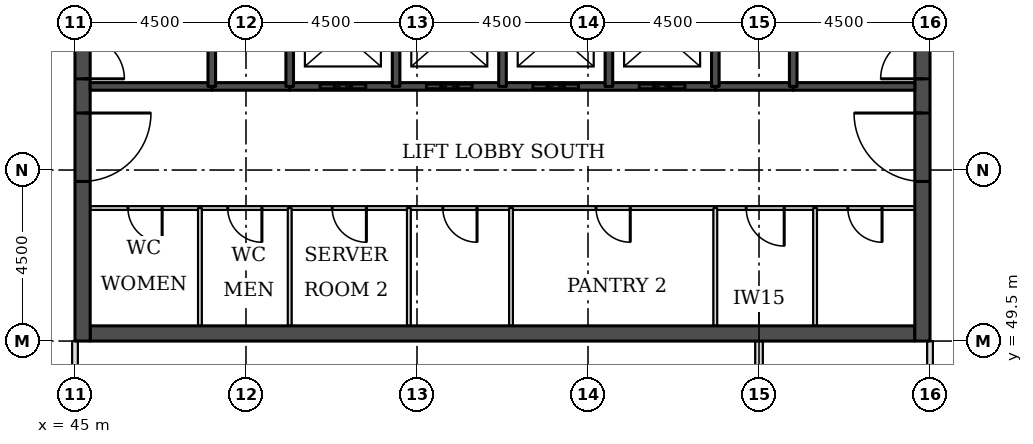
"""IFC4 building model, lengths in metres.
Left out: names, types, materials, properties, quantities, classifications, styles, units other than length and angle.
Written with IfcOpenShell. Run it as: python <this file> out.ifc"""

import sys

from ifc_helpers import new_model, si_unit, direction, frame, frame_2d, origin, place, context, subcontext, project, spatial, rectangle, extrude, element, fill, save


model = new_model("IFC4")
c1 = context("Model", 3, precision=1e-05, world=origin(), true_north=direction((0.0, 1.0)))
c2 = subcontext(c1, "Body", "Model", "MODEL_VIEW")
j1 = project(units=[si_unit("LENGTHUNIT", "METRE"), si_unit("PLANEANGLEUNIT", "RADIAN")], contexts=[c1])
p1 = place(None, origin())
s1 = spatial("IfcSite", under=j1, at=p1, CompositionType="ELEMENT")
p2 = place(p1, origin())
s2 = spatial("IfcBuilding", under=s1, at=p2, CompositionType="ELEMENT")
p3 = place(p2, frame((0.0, 0.0, 184.7)))
s3 = spatial("IfcBuildingStorey", under=s2, at=p3, CompositionType="ELEMENT", Elevation=184.7)
p4 = place(p3, frame((45.4, 49.7, 0.0), z_axis=(0.0, 0.0, 1.0), x_axis=(1.0, 0.0, 0.0)))
e1 = element("IfcWall", 1, at=p4, inside=s3, PredefinedType="SHEAR", context=c2, shape_type="SweptSolid", body=[
    extrude(rectangle(XDim=21.7, YDim=0.4, at=frame_2d((10.85, 0.0))), origin(), (0.0, 0.0, 1.0), 3.7),
])
p5 = place(p3, frame((45.2, 49.5, 0.0), z_axis=(0.0, 0.0, 1.0), x_axis=(0.0, 1.0, 0.0)))
e2 = element("IfcWall", 2, at=p5, inside=s3, PredefinedType="SHEAR", context=c2, shape_type="SweptSolid", body=[
    extrude(rectangle(XDim=22.5, YDim=0.4, at=frame_2d((11.25, 0.0))), origin(), (0.0, 0.0, 1.0), 3.7),
])
p6 = place(p5, frame((4.2, 0.0, 0.0)))
e3 = element("IfcOpeningElement", 3, at=p6, cuts=e2, PredefinedType="OPENING", context=c2, shape_type="SweptSolid", body=[
    extrude(rectangle(XDim=1.8, YDim=2.1, at=frame_2d((0.9, 1.05))), frame((0.0, 0.21, 0.0), z_axis=(0.0, -1.0, 0.0), x_axis=(1.0, 0.0, 0.0)), (0.0, 0.0, 1.0), 0.42),
])
p7 = place(p5, frame((6.9, 0.0, 0.0)))
e4 = element("IfcOpeningElement", 4, at=p7, cuts=e2, PredefinedType="OPENING", context=c2, shape_type="SweptSolid", body=[
    extrude(rectangle(XDim=1.1, YDim=2.1, at=frame_2d((0.55, 1.05))), frame((0.0, 0.21, 0.0), z_axis=(0.0, -1.0, 0.0), x_axis=(1.0, 0.0, 0.0)), (0.0, 0.0, 1.0), 0.42),
])
p8 = place(p5, frame((13.6, 0.0, 0.0)))
e5 = element("IfcOpeningElement", 5, at=p8, cuts=e2, PredefinedType="OPENING", context=c2, shape_type="SweptSolid", body=[
    extrude(rectangle(XDim=1.1, YDim=2.1, at=frame_2d((0.55, 1.05))), frame((0.0, 0.21, 0.0), z_axis=(0.0, -1.0, 0.0), x_axis=(1.0, 0.0, 0.0)), (0.0, 0.0, 1.0), 0.42),
])
p9 = place(p5, frame((16.5, 0.0, 0.0)))
e6 = element("IfcOpeningElement", 6, at=p9, cuts=e2, PredefinedType="OPENING", context=c2, shape_type="SweptSolid", body=[
    extrude(rectangle(XDim=1.8, YDim=2.1, at=frame_2d((0.9, 1.05))), frame((0.0, 0.21, 0.0), z_axis=(0.0, -1.0, 0.0), x_axis=(1.0, 0.0, 0.0)), (0.0, 0.0, 1.0), 0.42),
])
p10 = place(p3, frame((67.3, 49.5, 0.0), z_axis=(0.0, 0.0, 1.0), x_axis=(0.0, 1.0, 0.0)))
e7 = element("IfcWall", 7, at=p10, inside=s3, PredefinedType="SHEAR", context=c2, shape_type="SweptSolid", body=[
    extrude(rectangle(XDim=22.5, YDim=0.4, at=frame_2d((11.25, 0.0))), origin(), (0.0, 0.0, 1.0), 3.7),
])
p11 = place(p10, frame((4.2, 0.0, 0.0)))
e8 = element("IfcOpeningElement", 8, at=p11, cuts=e7, PredefinedType="OPENING", context=c2, shape_type="SweptSolid", body=[
    extrude(rectangle(XDim=1.8, YDim=2.1, at=frame_2d((0.9, 1.05))), frame((0.0, 0.21, 0.0), z_axis=(0.0, -1.0, 0.0), x_axis=(1.0, 0.0, 0.0)), (0.0, 0.0, 1.0), 0.42),
])
p12 = place(p10, frame((6.9, 0.0, 0.0)))
e9 = element("IfcOpeningElement", 9, at=p12, cuts=e7, PredefinedType="OPENING", context=c2, shape_type="SweptSolid", body=[
    extrude(rectangle(XDim=1.1, YDim=2.1, at=frame_2d((0.55, 1.05))), frame((0.0, 0.21, 0.0), z_axis=(0.0, -1.0, 0.0), x_axis=(1.0, 0.0, 0.0)), (0.0, 0.0, 1.0), 0.42),
])
p13 = place(p10, frame((13.6, 0.0, 0.0)))
e10 = element("IfcOpeningElement", 10, at=p13, cuts=e7, PredefinedType="OPENING", context=c2, shape_type="SweptSolid", body=[
    extrude(rectangle(XDim=1.1, YDim=2.1, at=frame_2d((0.55, 1.05))), frame((0.0, 0.21, 0.0), z_axis=(0.0, -1.0, 0.0), x_axis=(1.0, 0.0, 0.0)), (0.0, 0.0, 1.0), 0.42),
])
p14 = place(p10, frame((16.5, 0.0, 0.0)))
e11 = element("IfcOpeningElement", 11, at=p14, cuts=e7, PredefinedType="OPENING", context=c2, shape_type="SweptSolid", body=[
    extrude(rectangle(XDim=1.8, YDim=2.1, at=frame_2d((0.9, 1.05))), frame((0.0, 0.21, 0.0), z_axis=(0.0, -1.0, 0.0), x_axis=(1.0, 0.0, 0.0)), (0.0, 0.0, 1.0), 0.42),
])
p15 = place(p3, frame((67.5, 45.0, 0.0), z_axis=(0.0, 0.0, 1.0), x_axis=(0.0, 1.0, 0.0)))
e12 = element("IfcWall", 12, at=p15, inside=s3, PredefinedType="PARTITIONING", context=c2, shape_type="SweptSolid", body=[
    extrude(rectangle(XDim=4.5, YDim=0.15, at=frame_2d((2.25, 0.0))), origin(), (0.0, 0.0, 1.0), 3.022),
])
p16 = place(p3, frame((63.0, 46.5, 0.0), z_axis=(0.0, 0.0, 1.0), x_axis=(0.0, 1.0, 0.0)))
e13 = element("IfcWall", 13, at=p16, inside=s3, PredefinedType="PARTITIONING", context=c2, shape_type="SweptSolid", body=[
    extrude(rectangle(XDim=3.0, YDim=0.2, at=frame_2d((1.5, 0.0))), origin(), (0.0, 0.0, 1.0), 3.55),
])
p17 = place(p3, frame((45.0, 48.0, 0.0), z_axis=(0.0, 0.0, 1.0), x_axis=(0.0, 1.0, 0.0)))
e14 = element("IfcWall", 14, at=p17, inside=s3, PredefinedType="PARTITIONING", context=c2, shape_type="SweptSolid", body=[
    extrude(rectangle(XDim=1.5, YDim=0.15, at=frame_2d((0.75, 0.0))), origin(), (0.0, 0.0, 1.0), 3.022),
])
p18 = place(p3, frame((45.4, 53.0, 0.0), z_axis=(0.0, 0.0, 1.0), x_axis=(1.0, 0.0, 0.0)))
e15 = element("IfcWall", 15, at=p18, inside=s3, PredefinedType="PARTITIONING", context=c2, shape_type="SweptSolid", body=[
    extrude(rectangle(XDim=21.7, YDim=0.1, at=frame_2d((10.85, 0.0))), origin(), (0.0, 0.0, 1.0), 3.55),
])
p19 = place(p18, frame((19.938, 0.0, 0.0)))
e16 = element("IfcOpeningElement", 16, at=p19, cuts=e15, PredefinedType="OPENING", context=c2, shape_type="SweptSolid", body=[
    extrude(rectangle(XDim=0.9, YDim=2.1, at=frame_2d((0.45, 1.05))), frame((0.0, 0.06, 0.0), z_axis=(0.0, -1.0, 0.0), x_axis=(1.0, 0.0, 0.0)), (0.0, 0.0, 1.0), 0.12),
])
p20 = place(p18, frame((17.262, 0.0, 0.0)))
e17 = element("IfcOpeningElement", 17, at=p20, cuts=e15, PredefinedType="OPENING", context=c2, shape_type="SweptSolid", body=[
    extrude(rectangle(XDim=1.0, YDim=2.1, at=frame_2d((0.5, 1.05))), frame((0.0, 0.06, 0.0), z_axis=(0.0, -1.0, 0.0), x_axis=(1.0, 0.0, 0.0)), (0.0, 0.0, 1.0), 0.12),
])
p21 = place(p18, frame((0.994, 0.0, 0.0)))
e18 = element("IfcOpeningElement", 18, at=p21, cuts=e15, PredefinedType="OPENING", context=c2, shape_type="SweptSolid", body=[
    extrude(rectangle(XDim=0.9, YDim=2.1, at=frame_2d((0.45, 1.05))), frame((0.0, 0.06, 0.0), z_axis=(0.0, -1.0, 0.0), x_axis=(1.0, 0.0, 0.0)), (0.0, 0.0, 1.0), 0.12),
])
p22 = place(p18, frame((3.619, 0.0, 0.0)))
e19 = element("IfcOpeningElement", 19, at=p22, cuts=e15, PredefinedType="OPENING", context=c2, shape_type="SweptSolid", body=[
    extrude(rectangle(XDim=0.9, YDim=2.1, at=frame_2d((0.45, 1.05))), frame((0.0, 0.06, 0.0), z_axis=(0.0, -1.0, 0.0), x_axis=(1.0, 0.0, 0.0)), (0.0, 0.0, 1.0), 0.12),
])
p23 = place(p18, frame((6.368, 0.0, 0.0)))
e20 = element("IfcOpeningElement", 20, at=p23, cuts=e15, PredefinedType="OPENING", context=c2, shape_type="SweptSolid", body=[
    extrude(rectangle(XDim=0.9, YDim=2.1, at=frame_2d((0.45, 1.05))), frame((0.0, 0.06, 0.0), z_axis=(0.0, -1.0, 0.0), x_axis=(1.0, 0.0, 0.0)), (0.0, 0.0, 1.0), 0.12),
])
p24 = place(p18, frame((9.28, 0.0, 0.0)))
e21 = element("IfcOpeningElement", 21, at=p24, cuts=e15, PredefinedType="OPENING", context=c2, shape_type="SweptSolid", body=[
    extrude(rectangle(XDim=0.9, YDim=2.1, at=frame_2d((0.45, 1.05))), frame((0.0, 0.06, 0.0), z_axis=(0.0, -1.0, 0.0), x_axis=(1.0, 0.0, 0.0)), (0.0, 0.0, 1.0), 0.12),
])
p25 = place(p18, frame((13.312, 0.0, 0.0)))
e22 = element("IfcOpeningElement", 22, at=p25, cuts=e15, PredefinedType="OPENING", context=c2, shape_type="SweptSolid", body=[
    extrude(rectangle(XDim=0.9, YDim=2.1, at=frame_2d((0.45, 1.05))), frame((0.0, 0.06, 0.0), z_axis=(0.0, -1.0, 0.0), x_axis=(1.0, 0.0, 0.0)), (0.0, 0.0, 1.0), 0.12),
])
for number, where, z_axis, x_axis in (
    (23, (48.6, 56.2, 0.0), (0.0, 0.0, 1.0), (1.0, 0.0, 0.0)),
    (24, (61.85, 56.2, 0.0), (0.0, 0.0, 1.0), (1.0, 0.0, 0.0)),
):
    element("IfcWall", number, at=place(p3, frame(where, z_axis=z_axis, x_axis=x_axis)), inside=s3, PredefinedType="SOLIDWALL", context=c2, shape_type="SweptSolid", body=[
        extrude(rectangle(XDim=2.05, YDim=0.2, at=frame_2d((1.025, 0.0))), origin(), (0.0, 0.0, 1.0), 3.55),
    ])
p26 = place(p3, frame((45.4, 56.2, 0.0), z_axis=(0.0, 0.0, 1.0), x_axis=(1.0, 0.0, 0.0)))
e25 = element("IfcWall", 25, at=p26, inside=s3, PredefinedType="SOLIDWALL", context=c2, shape_type="SweptSolid", body=[
    extrude(rectangle(XDim=3.2, YDim=0.2, at=frame_2d((1.6, 0.0))), origin(), (0.0, 0.0, 1.0), 3.55),
])
p27 = place(p3, frame((50.65, 56.2, 0.0), z_axis=(0.0, 0.0, 1.0), x_axis=(1.0, 0.0, 0.0)))
e26 = element("IfcWall", 26, at=p27, inside=s3, PredefinedType="SOLIDWALL", context=c2, shape_type="SweptSolid", body=[
    extrude(rectangle(XDim=11.2, YDim=0.2, at=frame_2d((5.6, 0.0))), origin(), (0.0, 0.0, 1.0), 3.55),
])
p28 = place(p27, frame((0.8, 0.0, 0.0)))
e27 = element("IfcOpeningElement", 27, at=p28, cuts=e26, PredefinedType="OPENING", context=c2, shape_type="SweptSolid", body=[
    extrude(rectangle(XDim=1.2, YDim=2.1, at=frame_2d((0.6, 1.05))), frame((0.0, 0.11, 0.0), z_axis=(0.0, -1.0, 0.0), x_axis=(1.0, 0.0, 0.0)), (0.0, 0.0, 1.0), 0.22),
])
p29 = place(p27, frame((3.6, 0.0, 0.0)))
e28 = element("IfcOpeningElement", 28, at=p29, cuts=e26, PredefinedType="OPENING", context=c2, shape_type="SweptSolid", body=[
    extrude(rectangle(XDim=1.2, YDim=2.1, at=frame_2d((0.6, 1.05))), frame((0.0, 0.11, 0.0), z_axis=(0.0, -1.0, 0.0), x_axis=(1.0, 0.0, 0.0)), (0.0, 0.0, 1.0), 0.22),
])
p30 = place(p27, frame((6.4, 0.0, 0.0)))
e29 = element("IfcOpeningElement", 29, at=p30, cuts=e26, PredefinedType="OPENING", context=c2, shape_type="SweptSolid", body=[
    extrude(rectangle(XDim=1.2, YDim=2.1, at=frame_2d((0.6, 1.05))), frame((0.0, 0.11, 0.0), z_axis=(0.0, -1.0, 0.0), x_axis=(1.0, 0.0, 0.0)), (0.0, 0.0, 1.0), 0.22),
])
p31 = place(p27, frame((9.2, 0.0, 0.0)))
e30 = element("IfcOpeningElement", 30, at=p31, cuts=e26, PredefinedType="OPENING", context=c2, shape_type="SweptSolid", body=[
    extrude(rectangle(XDim=1.2, YDim=2.1, at=frame_2d((0.6, 1.05))), frame((0.0, 0.11, 0.0), z_axis=(0.0, -1.0, 0.0), x_axis=(1.0, 0.0, 0.0)), (0.0, 0.0, 1.0), 0.22),
])
p32 = place(p3, frame((63.9, 56.2, 0.0), z_axis=(0.0, 0.0, 1.0), x_axis=(1.0, 0.0, 0.0)))
e31 = element("IfcWall", 31, at=p32, inside=s3, PredefinedType="SOLIDWALL", context=c2, shape_type="SweptSolid", body=[
    extrude(rectangle(XDim=3.2, YDim=0.2, at=frame_2d((1.6, 0.0))), origin(), (0.0, 0.0, 1.0), 3.55),
])
p33 = place(p3, frame((48.288, 49.9, 0.0), z_axis=(0.0, 0.0, 1.0), x_axis=(0.0, 1.0, 0.0)))
e32 = element("IfcWall", 32, at=p33, inside=s3, PredefinedType="PARTITIONING", context=c2, shape_type="SweptSolid", body=[
    extrude(rectangle(XDim=3.1, YDim=0.1, at=frame_2d((1.55, 0.0))), origin(), (0.0, 0.0, 1.0), 3.55),
])
p34 = place(p3, frame((48.6, 56.2, 0.0), z_axis=(0.0, 0.0, 1.0), x_axis=(0.0, 1.0, 0.0)))
e33 = element("IfcWall", 33, at=p34, inside=s3, PredefinedType="SOLIDWALL", context=c2, shape_type="SweptSolid", body=[
    extrude(rectangle(XDim=5.8, YDim=0.2, at=frame_2d((2.9, 0.0))), origin(), (0.0, 0.0, 1.0), 3.55),
])
p35 = place(p3, frame((50.65, 49.9, 0.0), z_axis=(0.0, 0.0, 1.0), x_axis=(0.0, 1.0, 0.0)))
e34 = element("IfcWall", 34, at=p35, inside=s3, PredefinedType="PARTITIONING", context=c2, shape_type="SweptSolid", body=[
    extrude(rectangle(XDim=3.1, YDim=0.1, at=frame_2d((1.55, 0.0))), origin(), (0.0, 0.0, 1.0), 3.55),
])
for number, where, z_axis, x_axis in (
    (35, (50.65, 56.2, 0.0), (0.0, 0.0, 1.0), (0.0, 1.0, 0.0)),
    (36, (53.45, 56.2, 0.0), (0.0, 0.0, 1.0), (0.0, 1.0, 0.0)),
):
    element("IfcWall", number, at=place(p3, frame(where, z_axis=z_axis, x_axis=x_axis)), inside=s3, PredefinedType="SOLIDWALL", context=c2, shape_type="SweptSolid", body=[
        extrude(rectangle(XDim=2.8, YDim=0.2, at=frame_2d((1.4, 0.0))), origin(), (0.0, 0.0, 1.0), 3.55),
    ])
p36 = place(p3, frame((53.786, 49.9, 0.0), z_axis=(0.0, 0.0, 1.0), x_axis=(0.0, 1.0, 0.0)))
e37 = element("IfcWall", 37, at=p36, inside=s3, PredefinedType="PARTITIONING", context=c2, shape_type="SweptSolid", body=[
    extrude(rectangle(XDim=3.1, YDim=0.1, at=frame_2d((1.55, 0.0))), origin(), (0.0, 0.0, 1.0), 3.55),
])
p37 = place(p3, frame((56.25, 56.2, 0.0), z_axis=(0.0, 0.0, 1.0), x_axis=(0.0, 1.0, 0.0)))
e38 = element("IfcWall", 38, at=p37, inside=s3, PredefinedType="SOLIDWALL", context=c2, shape_type="SweptSolid", body=[
    extrude(rectangle(XDim=2.8, YDim=0.2, at=frame_2d((1.4, 0.0))), origin(), (0.0, 0.0, 1.0), 3.55),
])
p38 = place(p3, frame((56.474, 49.9, 0.0), z_axis=(0.0, 0.0, 1.0), x_axis=(0.0, 1.0, 0.0)))
e39 = element("IfcWall", 39, at=p38, inside=s3, PredefinedType="PARTITIONING", context=c2, shape_type="SweptSolid", body=[
    extrude(rectangle(XDim=3.1, YDim=0.1, at=frame_2d((1.55, 0.0))), origin(), (0.0, 0.0, 1.0), 3.55),
])
p39 = place(p3, frame((59.05, 56.2, 0.0), z_axis=(0.0, 0.0, 1.0), x_axis=(0.0, 1.0, 0.0)))
e40 = element("IfcWall", 40, at=p39, inside=s3, PredefinedType="SOLIDWALL", context=c2, shape_type="SweptSolid", body=[
    extrude(rectangle(XDim=2.8, YDim=0.2, at=frame_2d((1.4, 0.0))), origin(), (0.0, 0.0, 1.0), 3.55),
])
p40 = place(p3, frame((61.85, 49.9, 0.0), z_axis=(0.0, 0.0, 1.0), x_axis=(0.0, 1.0, 0.0)))
e41 = element("IfcWall", 41, at=p40, inside=s3, PredefinedType="PARTITIONING", context=c2, shape_type="SweptSolid", body=[
    extrude(rectangle(XDim=3.1, YDim=0.1, at=frame_2d((1.55, 0.0))), origin(), (0.0, 0.0, 1.0), 3.55),
])
p41 = place(p3, frame((61.85, 56.2, 0.0), z_axis=(0.0, 0.0, 1.0), x_axis=(0.0, 1.0, 0.0)))
e42 = element("IfcWall", 42, at=p41, inside=s3, PredefinedType="SOLIDWALL", context=c2, shape_type="SweptSolid", body=[
    extrude(rectangle(XDim=2.8, YDim=0.2, at=frame_2d((1.4, 0.0))), origin(), (0.0, 0.0, 1.0), 3.55),
])
p42 = place(p3, frame((63.9, 56.2, 0.0), z_axis=(0.0, 0.0, 1.0), x_axis=(0.0, 1.0, 0.0)))
e43 = element("IfcWall", 43, at=p42, inside=s3, PredefinedType="SOLIDWALL", context=c2, shape_type="SweptSolid", body=[
    extrude(rectangle(XDim=5.8, YDim=0.2, at=frame_2d((2.9, 0.0))), origin(), (0.0, 0.0, 1.0), 3.55),
])
p43 = place(p3, frame((64.475, 49.9, 0.0), z_axis=(0.0, 0.0, 1.0), x_axis=(0.0, 1.0, 0.0)))
e44 = element("IfcWall", 44, at=p43, inside=s3, PredefinedType="PARTITIONING", context=c2, shape_type="SweptSolid", body=[
    extrude(rectangle(XDim=3.1, YDim=0.1, at=frame_2d((1.55, 0.0))), origin(), (0.0, 0.0, 1.0), 3.55),
])
p44 = place(p28, origin())
e45 = element("IfcDoor", 45, at=p44, inside=s3, OperationType="DOUBLE_DOOR_SLIDING", PredefinedType="DOOR", context=c2, shape_type="SweptSolid", body=[
    extrude(rectangle(XDim=1.2, YDim=2.1, at=frame_2d((0.6, 1.05))), frame((0.0, 0.025, 0.0), z_axis=(0.0, -1.0, 0.0), x_axis=(1.0, 0.0, 0.0)), (0.0, 0.0, 1.0), 0.05),
])
fill(e27, e45)
p45 = place(p29, origin())
e46 = element("IfcDoor", 46, at=p45, inside=s3, OperationType="DOUBLE_DOOR_SLIDING", PredefinedType="DOOR", context=c2, shape_type="SweptSolid", body=[
    extrude(rectangle(XDim=1.2, YDim=2.1, at=frame_2d((0.6, 1.05))), frame((0.0, 0.025, 0.0), z_axis=(0.0, -1.0, 0.0), x_axis=(1.0, 0.0, 0.0)), (0.0, 0.0, 1.0), 0.05),
])
fill(e28, e46)
p46 = place(p30, origin())
e47 = element("IfcDoor", 47, at=p46, inside=s3, OperationType="DOUBLE_DOOR_SLIDING", PredefinedType="DOOR", context=c2, shape_type="SweptSolid", body=[
    extrude(rectangle(XDim=1.2, YDim=2.1, at=frame_2d((0.6, 1.05))), frame((0.0, 0.025, 0.0), z_axis=(0.0, -1.0, 0.0), x_axis=(1.0, 0.0, 0.0)), (0.0, 0.0, 1.0), 0.05),
])
fill(e29, e47)
p47 = place(p31, origin())
e48 = element("IfcDoor", 48, at=p47, inside=s3, OperationType="DOUBLE_DOOR_SLIDING", PredefinedType="DOOR", context=c2, shape_type="SweptSolid", body=[
    extrude(rectangle(XDim=1.2, YDim=2.1, at=frame_2d((0.6, 1.05))), frame((0.0, 0.025, 0.0), z_axis=(0.0, -1.0, 0.0), x_axis=(1.0, 0.0, 0.0)), (0.0, 0.0, 1.0), 0.05),
])
fill(e30, e48)
p48 = place(p6, frame((1.8, 0.0, 0.0), z_axis=(0.0, 0.0, 1.0), x_axis=(-1.0, 0.0, 0.0)))
e49 = element("IfcDoor", 49, at=p48, inside=s3, OperationType="SINGLE_SWING_LEFT", PredefinedType="DOOR", context=c2, shape_type="SweptSolid", body=[
    extrude(rectangle(XDim=1.8, YDim=2.1, at=frame_2d((0.9, 1.05))), frame((0.0, 0.025, 0.0), z_axis=(0.0, -1.0, 0.0), x_axis=(1.0, 0.0, 0.0)), (0.0, 0.0, 1.0), 0.05),
])
fill(e3, e49)
p49 = place(p7, frame((1.1, 0.0, 0.0), z_axis=(0.0, 0.0, 1.0), x_axis=(-1.0, 0.0, 0.0)))
e50 = element("IfcDoor", 50, at=p49, inside=s3, OperationType="SINGLE_SWING_RIGHT", PredefinedType="DOOR", context=c2, shape_type="SweptSolid", body=[
    extrude(rectangle(XDim=1.1, YDim=2.1, at=frame_2d((0.55, 1.05))), frame((0.0, 0.025, 0.0), z_axis=(0.0, -1.0, 0.0), x_axis=(1.0, 0.0, 0.0)), (0.0, 0.0, 1.0), 0.05),
])
fill(e4, e50)
p50 = place(p11, origin())
e51 = element("IfcDoor", 51, at=p50, inside=s3, OperationType="SINGLE_SWING_RIGHT", PredefinedType="DOOR", context=c2, shape_type="SweptSolid", body=[
    extrude(rectangle(XDim=1.8, YDim=2.1, at=frame_2d((0.9, 1.05))), frame((0.0, 0.025, 0.0), z_axis=(0.0, -1.0, 0.0), x_axis=(1.0, 0.0, 0.0)), (0.0, 0.0, 1.0), 0.05),
])
fill(e8, e51)
p51 = place(p12, origin())
e52 = element("IfcDoor", 52, at=p51, inside=s3, OperationType="SINGLE_SWING_LEFT", PredefinedType="DOOR", context=c2, shape_type="SweptSolid", body=[
    extrude(rectangle(XDim=1.1, YDim=2.1, at=frame_2d((0.55, 1.05))), frame((0.0, 0.025, 0.0), z_axis=(0.0, -1.0, 0.0), x_axis=(1.0, 0.0, 0.0)), (0.0, 0.0, 1.0), 0.05),
])
fill(e9, e52)
p52 = place(p19, frame((0.9, 0.0, 0.0), z_axis=(0.0, 0.0, 1.0), x_axis=(-1.0, 0.0, 0.0)))
e53 = element("IfcDoor", 53, at=p52, inside=s3, OperationType="SINGLE_SWING_LEFT", PredefinedType="DOOR", context=c2, shape_type="SweptSolid", body=[
    extrude(rectangle(XDim=0.9, YDim=2.1, at=frame_2d((0.45, 1.05))), frame((0.0, 0.025, 0.0), z_axis=(0.0, -1.0, 0.0), x_axis=(1.0, 0.0, 0.0)), (0.0, 0.0, 1.0), 0.05),
])
fill(e16, e53)
p53 = place(p20, frame((1.0, 0.0, 0.0), z_axis=(0.0, 0.0, 1.0), x_axis=(-1.0, 0.0, 0.0)))
e54 = element("IfcDoor", 54, at=p53, inside=s3, OperationType="SINGLE_SWING_LEFT", PredefinedType="DOOR", context=c2, shape_type="SweptSolid", body=[
    extrude(rectangle(XDim=1.0, YDim=2.1, at=frame_2d((0.5, 1.05))), frame((0.0, 0.025, 0.0), z_axis=(0.0, -1.0, 0.0), x_axis=(1.0, 0.0, 0.0)), (0.0, 0.0, 1.0), 0.05),
])
fill(e17, e54)
p54 = place(p21, frame((0.9, 0.0, 0.0), z_axis=(0.0, 0.0, 1.0), x_axis=(-1.0, 0.0, 0.0)))
e55 = element("IfcDoor", 55, at=p54, inside=s3, OperationType="SINGLE_SWING_LEFT", PredefinedType="DOOR", context=c2, shape_type="SweptSolid", body=[
    extrude(rectangle(XDim=0.9, YDim=2.1, at=frame_2d((0.45, 1.05))), frame((0.0, 0.025, 0.0), z_axis=(0.0, -1.0, 0.0), x_axis=(1.0, 0.0, 0.0)), (0.0, 0.0, 1.0), 0.05),
])
fill(e18, e55)
p55 = place(p22, frame((0.9, 0.0, 0.0), z_axis=(0.0, 0.0, 1.0), x_axis=(-1.0, 0.0, 0.0)))
e56 = element("IfcDoor", 56, at=p55, inside=s3, OperationType="SINGLE_SWING_LEFT", PredefinedType="DOOR", context=c2, shape_type="SweptSolid", body=[
    extrude(rectangle(XDim=0.9, YDim=2.1, at=frame_2d((0.45, 1.05))), frame((0.0, 0.025, 0.0), z_axis=(0.0, -1.0, 0.0), x_axis=(1.0, 0.0, 0.0)), (0.0, 0.0, 1.0), 0.05),
])
fill(e19, e56)
p56 = place(p23, frame((0.9, 0.0, 0.0), z_axis=(0.0, 0.0, 1.0), x_axis=(-1.0, 0.0, 0.0)))
e57 = element("IfcDoor", 57, at=p56, inside=s3, OperationType="SINGLE_SWING_LEFT", PredefinedType="DOOR", context=c2, shape_type="SweptSolid", body=[
    extrude(rectangle(XDim=0.9, YDim=2.1, at=frame_2d((0.45, 1.05))), frame((0.0, 0.025, 0.0), z_axis=(0.0, -1.0, 0.0), x_axis=(1.0, 0.0, 0.0)), (0.0, 0.0, 1.0), 0.05),
])
fill(e20, e57)
p57 = place(p24, frame((0.9, 0.0, 0.0), z_axis=(0.0, 0.0, 1.0), x_axis=(-1.0, 0.0, 0.0)))
e58 = element("IfcDoor", 58, at=p57, inside=s3, OperationType="SINGLE_SWING_LEFT", PredefinedType="DOOR", context=c2, shape_type="SweptSolid", body=[
    extrude(rectangle(XDim=0.9, YDim=2.1, at=frame_2d((0.45, 1.05))), frame((0.0, 0.025, 0.0), z_axis=(0.0, -1.0, 0.0), x_axis=(1.0, 0.0, 0.0)), (0.0, 0.0, 1.0), 0.05),
])
fill(e21, e58)
p58 = place(p25, frame((0.9, 0.0, 0.0), z_axis=(0.0, 0.0, 1.0), x_axis=(-1.0, 0.0, 0.0)))
e59 = element("IfcDoor", 59, at=p58, inside=s3, OperationType="SINGLE_SWING_LEFT", PredefinedType="DOOR", context=c2, shape_type="SweptSolid", body=[
    extrude(rectangle(XDim=0.9, YDim=2.1, at=frame_2d((0.45, 1.05))), frame((0.0, 0.025, 0.0), z_axis=(0.0, -1.0, 0.0), x_axis=(1.0, 0.0, 0.0)), (0.0, 0.0, 1.0), 0.05),
])
fill(e22, e59)
save(model, sys.argv[1])
